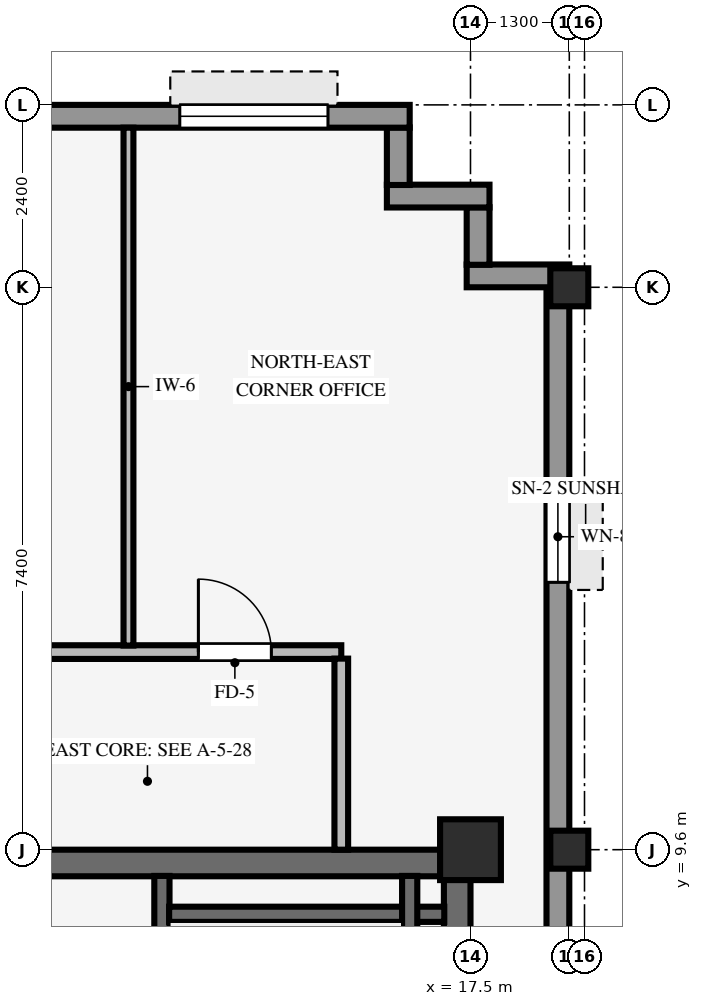
"""IFC4 building model, lengths in metres.
Left out: names, types, materials, properties, quantities, classifications, styles, units other than length and angle.
Written with IfcOpenShell. Run it as: python <this file> out.ifc"""

import sys

from ifc_helpers import new_model, si_unit, direction, frame, frame_2d, origin, origin_2d, place, context, subcontext, project, spatial, rectangle, hollow_rectangle, extrude, source, transform, mapped, element, fill, save


model = new_model("IFC4")
c1 = context("Model", 3, precision=1e-05, world=origin(), true_north=direction((0.0, 1.0)))
c2 = subcontext(c1, "Body", "Model", "MODEL_VIEW")
j1 = project(units=[si_unit("LENGTHUNIT", "METRE"), si_unit("PLANEANGLEUNIT", "RADIAN")], contexts=[c1])
p1 = place(None, origin())
s1 = spatial("IfcSite", under=j1, at=p1, CompositionType="ELEMENT")
p2 = place(p1, origin())
s2 = spatial("IfcBuilding", under=s1, at=p2, CompositionType="ELEMENT")
p3 = place(p2, frame((0.0, 0.0, 261.6)))
s3 = spatial("IfcBuildingStorey", under=s2, at=p3, CompositionType="ELEMENT", Elevation=261.6)
p4 = place(p3, frame((9.0, 9.425, 0.0), z_axis=(0.0, 0.0, 1.0), x_axis=(1.0, 0.0, 0.0)))
e1 = element("IfcWall", 1, at=p4, inside=s3, PredefinedType="SHEAR", context=c2, shape_type="SweptSolid", body=[
    extrude(rectangle(XDim=8.5, YDim=0.35, at=frame_2d((4.25, 0.0))), origin(), (0.0, 0.0, 1.0), 3.37),
])
p5 = place(p3, frame((17.325, -9.255, 0.0), z_axis=(0.0, 0.0, 1.0), x_axis=(0.0, 1.0, 0.0)))
e2 = element("IfcWall", 2, at=p5, inside=s3, PredefinedType="SHEAR", context=c2, shape_type="SweptSolid", body=[
    extrude(rectangle(XDim=18.51, YDim=0.35, at=frame_2d((9.255, 0.0))), origin(), (0.0, 0.0, 1.0), 3.37),
])
p6 = place(p3, frame((17.5, 9.6, 0.0), z_axis=(0.0, 0.0, 1.0), x_axis=(1.0, 0.0, 0.0)))
e3 = element("IfcColumn", 3, at=p6, inside=s3, PredefinedType="COLUMN", context=c2, shape_type="SweptSolid", body=[
    extrude(rectangle(XDim=0.8, YDim=0.8, at=origin_2d()), origin(), (0.0, 0.0, 1.0), 3.37),
])
for number, where, z_axis, x_axis in (
    (4, (18.8, 9.6, 0.0), (0.0, 0.0, 1.0), (1.0, 0.0, 0.0)),
    (5, (18.8, 17.0, 0.0), (0.0, 0.0, 1.0), (1.0, 0.0, 0.0)),
):
    element("IfcColumn", number, at=place(p3, frame(where, z_axis=z_axis, x_axis=x_axis)), inside=s3, PredefinedType="COLUMN", context=c2, shape_type="SweptSolid", body=[
        extrude(hollow_rectangle(XDim=0.5, YDim=0.5, WallThickness=0.032, InnerFilletRadius=0.032, OuterFilletRadius=0.064, at=origin_2d()), origin(), (0.0, 0.0, 1.0), 3.37),
    ])
p7 = place(p3, frame((18.65, -17.004, 0.0), z_axis=(0.0, 0.0, 1.0), x_axis=(0.0, 1.0, 0.0)))
e6 = element("IfcWall", 6, at=p7, inside=s3, PredefinedType="STANDARD", context=c2, shape_type="SweptSolid", body=[
    extrude(rectangle(XDim=34.008, YDim=0.3, at=frame_2d((17.004, 0.0))), origin(), (0.0, 0.0, 1.0), 2.705),
])
p8 = place(p7, frame((2.686, 0.0, 0.8)))
e7 = element("IfcOpeningElement", 7, at=p8, cuts=e6, PredefinedType="OPENING", context=c2, shape_type="SweptSolid", body=[
    extrude(rectangle(XDim=1.2, YDim=1.48, at=frame_2d((0.6, 0.74))), frame((0.0, 0.16, 0.0), z_axis=(0.0, -1.0, 0.0), x_axis=(1.0, 0.0, 0.0)), (0.0, 0.0, 1.0), 0.32),
])
p9 = place(p7, frame((30.122, 0.0, 0.8)))
e8 = element("IfcOpeningElement", 8, at=p9, cuts=e6, PredefinedType="OPENING", context=c2, shape_type="SweptSolid", body=[
    extrude(rectangle(XDim=1.2, YDim=1.48, at=frame_2d((0.6, 0.74))), frame((0.0, 0.16, 0.0), z_axis=(0.0, -1.0, 0.0), x_axis=(1.0, 0.0, 0.0)), (0.0, 0.0, 1.0), 0.32),
])
p10 = place(p3, frame((17.45, 17.15, 0.0), z_axis=(0.0, 0.0, 1.0), x_axis=(1.0, 0.0, 0.0)))
e9 = element("IfcWall", 9, at=p10, inside=s3, PredefinedType="STANDARD", context=c2, shape_type="SweptSolid", body=[
    extrude(rectangle(XDim=1.35, YDim=0.3, at=frame_2d((0.675, 0.0))), origin(), (0.0, 0.0, 1.0), 2.892),
])
p11 = place(p3, frame((17.6, 17.296, 0.0), z_axis=(0.0, 0.0, 1.0), x_axis=(0.0, 1.0, 0.0)))
e10 = element("IfcWall", 10, at=p11, inside=s3, PredefinedType="STANDARD", context=c2, shape_type="SweptSolid", body=[
    extrude(rectangle(XDim=0.758, YDim=0.3, at=frame_2d((0.379, 0.0))), origin(), (0.0, 0.0, 1.0), 2.892),
])
p12 = place(p3, frame((16.4, 18.2, 0.0), z_axis=(0.0, 0.0, 1.0), x_axis=(1.0, 0.0, 0.0)))
e11 = element("IfcWall", 11, at=p12, inside=s3, PredefinedType="STANDARD", context=c2, shape_type="SweptSolid", body=[
    extrude(rectangle(XDim=1.35, YDim=0.3, at=frame_2d((0.675, 0.0))), origin(), (0.0, 0.0, 1.0), 2.892),
])
p13 = place(p3, frame((16.55, 18.346, 0.0), z_axis=(0.0, 0.0, 1.0), x_axis=(0.0, 1.0, 0.0)))
e12 = element("IfcWall", 12, at=p13, inside=s3, PredefinedType="STANDARD", context=c2, shape_type="SweptSolid", body=[
    extrude(rectangle(XDim=0.758, YDim=0.3, at=frame_2d((0.379, 0.0))), origin(), (0.0, 0.0, 1.0), 2.892),
])
p14 = place(p3, frame((-18.9, 19.25, 0.0), z_axis=(0.0, 0.0, 1.0), x_axis=(1.0, 0.0, 0.0)))
e13 = element("IfcWall", 13, at=p14, inside=s3, PredefinedType="STANDARD", context=c2, shape_type="SweptSolid", body=[
    extrude(rectangle(XDim=35.6, YDim=0.3, at=frame_2d((17.8, 0.0))), origin(), (0.0, 0.0, 1.0), 2.705),
])
p15 = place(p14, frame((13.6, 0.0, 0.0)))
e14 = element("IfcOpeningElement", 14, at=p15, cuts=e13, PredefinedType="OPENING", context=c2, shape_type="SweptSolid", body=[
    extrude(rectangle(XDim=0.98, YDim=2.15, at=frame_2d((0.49, 1.075))), frame((0.0, 0.16, 0.0), z_axis=(0.0, -1.0, 0.0), x_axis=(1.0, 0.0, 0.0)), (0.0, 0.0, 1.0), 0.32),
])
p16 = place(p14, frame((2.425, 0.0, 0.8)))
e15 = element("IfcOpeningElement", 15, at=p16, cuts=e13, PredefinedType="OPENING", context=c2, shape_type="SweptSolid", body=[
    extrude(rectangle(XDim=1.95, YDim=1.48, at=frame_2d((0.975, 0.74))), frame((0.0, 0.16, 0.0), z_axis=(0.0, -1.0, 0.0), x_axis=(1.0, 0.0, 0.0)), (0.0, 0.0, 1.0), 0.32),
])
p17 = place(p14, frame((7.225, 0.0, 0.8)))
e16 = element("IfcOpeningElement", 16, at=p17, cuts=e13, PredefinedType="OPENING", context=c2, shape_type="SweptSolid", body=[
    extrude(rectangle(XDim=1.95, YDim=1.48, at=frame_2d((0.975, 0.74))), frame((0.0, 0.16, 0.0), z_axis=(0.0, -1.0, 0.0), x_axis=(1.0, 0.0, 0.0)), (0.0, 0.0, 1.0), 0.32),
])
p18 = place(p14, frame((15.475, 0.0, 0.8)))
e17 = element("IfcOpeningElement", 17, at=p18, cuts=e13, PredefinedType="OPENING", context=c2, shape_type="SweptSolid", body=[
    extrude(rectangle(XDim=1.95, YDim=1.48, at=frame_2d((0.975, 0.74))), frame((0.0, 0.16, 0.0), z_axis=(0.0, -1.0, 0.0), x_axis=(1.0, 0.0, 0.0)), (0.0, 0.0, 1.0), 0.32),
])
p19 = place(p14, frame((21.625, 0.0, 0.8)))
e18 = element("IfcOpeningElement", 18, at=p19, cuts=e13, PredefinedType="OPENING", context=c2, shape_type="SweptSolid", body=[
    extrude(rectangle(XDim=1.95, YDim=1.48, at=frame_2d((0.975, 0.74))), frame((0.0, 0.16, 0.0), z_axis=(0.0, -1.0, 0.0), x_axis=(1.0, 0.0, 0.0)), (0.0, 0.0, 1.0), 0.32),
])
p20 = place(p14, frame((32.575, 0.0, 0.8)))
e19 = element("IfcOpeningElement", 19, at=p20, cuts=e13, PredefinedType="OPENING", context=c2, shape_type="SweptSolid", body=[
    extrude(rectangle(XDim=1.95, YDim=1.48, at=frame_2d((0.975, 0.74))), frame((0.0, 0.16, 0.0), z_axis=(0.0, -1.0, 0.0), x_axis=(1.0, 0.0, 0.0)), (0.0, 0.0, 1.0), 0.32),
])
p21 = place(p3, frame((13.44, 0.9, 0.0), z_axis=(0.0, 0.0, 1.0), x_axis=(0.0, 1.0, 0.0)))
e20 = element("IfcWall", 20, at=p21, inside=s3, PredefinedType="SHEAR", context=c2, shape_type="SweptSolid", body=[
    extrude(rectangle(XDim=8.355, YDim=0.2, at=frame_2d((4.177, 0.0))), origin(), (0.0, 0.0, 1.0), 3.37),
])
p22 = place(p21, frame((0.43, 0.0, 0.0)))
e21 = element("IfcOpeningElement", 21, at=p22, cuts=e20, PredefinedType="OPENING", context=c2, shape_type="SweptSolid", body=[
    extrude(rectangle(XDim=1.1, YDim=2.15, at=frame_2d((0.55, 1.075))), frame((0.0, 0.11, 0.0), z_axis=(0.0, -1.0, 0.0), x_axis=(1.0, 0.0, 0.0)), (0.0, 0.0, 1.0), 0.22),
])
p23 = place(p3, frame((13.535, 8.75, 0.0), z_axis=(0.0, 0.0, 1.0), x_axis=(1.0, 0.0, 0.0)))
e22 = element("IfcWall", 22, at=p23, inside=s3, PredefinedType="SHEAR", context=c2, shape_type="SweptSolid", body=[
    extrude(rectangle(XDim=3.62, YDim=0.2, at=frame_2d((1.81, 0.0))), origin(), (0.0, 0.0, 1.0), 3.37),
])
p24 = place(p3, frame((16.7, 1.095, 0.0), z_axis=(0.0, 0.0, 1.0), x_axis=(0.0, 1.0, 0.0)))
e23 = element("IfcWall", 23, at=p24, inside=s3, PredefinedType="SHEAR", context=c2, shape_type="SweptSolid", body=[
    extrude(rectangle(XDim=8.16, YDim=0.2, at=frame_2d((4.08, 0.0))), origin(), (0.0, 0.0, 1.0), 3.37),
])
p25 = place(p3, frame((-9.0, 12.2, 0.0), z_axis=(0.0, 0.0, 1.0), x_axis=(1.0, 0.0, 0.0)))
e24 = element("IfcWall", 24, at=p25, inside=s3, PredefinedType="PARTITIONING", context=c2, shape_type="SweptSolid", body=[
    extrude(rectangle(XDim=24.8, YDim=0.18, at=frame_2d((12.4, 0.0))), origin(), (0.0, 0.0, 1.0), 3.36),
])
p26 = place(p25, frame((11.42, 0.0, 0.0)))
e25 = element("IfcOpeningElement", 25, at=p26, cuts=e24, PredefinedType="OPENING", context=c2, shape_type="SweptSolid", body=[
    extrude(rectangle(XDim=0.96, YDim=2.1, at=frame_2d((0.48, 1.05))), frame((0.0, 0.1, 0.0), z_axis=(0.0, -1.0, 0.0), x_axis=(1.0, 0.0, 0.0)), (0.0, 0.0, 1.0), 0.2),
])
p27 = place(p25, frame((4.82, 0.0, 0.0)))
e26 = element("IfcOpeningElement", 26, at=p27, cuts=e24, PredefinedType="OPENING", context=c2, shape_type="SweptSolid", body=[
    extrude(rectangle(XDim=0.96, YDim=2.1, at=frame_2d((0.48, 1.05))), frame((0.0, 0.1, 0.0), z_axis=(0.0, -1.0, 0.0), x_axis=(1.0, 0.0, 0.0)), (0.0, 0.0, 1.0), 0.2),
])
p28 = place(p25, frame((19.52, 0.0, 0.0)))
e27 = element("IfcOpeningElement", 27, at=p28, cuts=e24, PredefinedType="OPENING", context=c2, shape_type="SweptSolid", body=[
    extrude(rectangle(XDim=0.96, YDim=2.1, at=frame_2d((0.48, 1.05))), frame((0.0, 0.1, 0.0), z_axis=(0.0, -1.0, 0.0), x_axis=(1.0, 0.0, 0.0)), (0.0, 0.0, 1.0), 0.2),
])
p29 = place(p25, frame((22.92, 0.0, 0.0)))
e28 = element("IfcOpeningElement", 28, at=p29, cuts=e24, PredefinedType="OPENING", context=c2, shape_type="SweptSolid", body=[
    extrude(rectangle(XDim=0.96, YDim=2.1, at=frame_2d((0.48, 1.05))), frame((0.0, 0.1, 0.0), z_axis=(0.0, -1.0, 0.0), x_axis=(1.0, 0.0, 0.0)), (0.0, 0.0, 1.0), 0.2),
])
p30 = place(p25, frame((0.75, 0.0, 0.0)))
e29 = element("IfcOpeningElement", 29, at=p30, cuts=e24, PredefinedType="OPENING", context=c2, shape_type="SweptSolid", body=[
    extrude(rectangle(XDim=0.9, YDim=2.1, at=frame_2d((0.45, 1.05))), frame((0.0, 0.1, 0.0), z_axis=(0.0, -1.0, 0.0), x_axis=(1.0, 0.0, 0.0)), (0.0, 0.0, 1.0), 0.2),
])
p31 = place(p3, frame((13.0, 12.286, 0.0), z_axis=(0.0, 0.0, 1.0), x_axis=(0.0, 1.0, 0.0)))
e30 = element("IfcWall", 30, at=p31, inside=s3, PredefinedType="PARTITIONING", context=c2, shape_type="SweptSolid", body=[
    extrude(rectangle(XDim=6.814, YDim=0.13, at=frame_2d((3.407, 0.0))), origin(), (0.0, 0.0, 1.0), 3.36),
])
p32 = place(p3, frame((15.8, 9.6, 0.0), z_axis=(0.0, 0.0, 1.0), x_axis=(0.0, 1.0, 0.0)))
e31 = element("IfcWall", 31, at=p32, inside=s3, PredefinedType="PARTITIONING", context=c2, shape_type="SweptSolid", body=[
    extrude(rectangle(XDim=2.514, YDim=0.18, at=frame_2d((1.257, 0.0))), origin(), (0.0, 0.0, 1.0), 3.36),
])
m1 = source(origin(), c2, "Body", "SweptSolid", [
    extrude(rectangle(XDim=1.2, YDim=1.48, at=frame_2d((0.6, 0.74))), frame((0.0, 0.03, 0.0), z_axis=(0.0, -1.0, 0.0), x_axis=(1.0, 0.0, 0.0)), (0.0, 0.0, 1.0), 0.06),
])
p33 = place(p9, origin())
e32 = element("IfcWindow", 32, at=p33, inside=s3, PartitioningType="SINGLE_PANEL", PredefinedType="WINDOW", context=c2, shape_type="MappedRepresentation", body=[
    mapped(m1, transform((0.0, 0.0, 0.0), scale=1.0)),
])
fill(e8, e32)
m2 = source(origin(), c2, "Body", "SweptSolid", [
    extrude(rectangle(XDim=1.95, YDim=1.48, at=frame_2d((0.975, 0.74))), frame((0.0, 0.03, 0.0), z_axis=(0.0, -1.0, 0.0), x_axis=(1.0, 0.0, 0.0)), (0.0, 0.0, 1.0), 0.06),
])
p34 = place(p20, origin())
e33 = element("IfcWindow", 33, at=p34, inside=s3, PartitioningType="SINGLE_PANEL", PredefinedType="WINDOW", context=c2, shape_type="MappedRepresentation", body=[
    mapped(m2, transform((0.0, 0.0, 0.0), scale=1.0)),
])
fill(e19, e33)
m3 = source(origin(), c2, "Body", "SweptSolid", [
    extrude(rectangle(XDim=0.96, YDim=2.1, at=frame_2d((0.48, 1.05))), frame((0.0, 0.025, 0.0), z_axis=(0.0, -1.0, 0.0), x_axis=(1.0, 0.0, 0.0)), (0.0, 0.0, 1.0), 0.05),
])
p35 = place(p29, origin())
e34 = element("IfcDoor", 34, at=p35, inside=s3, OperationType="SINGLE_SWING_LEFT", PredefinedType="DOOR", context=c2, shape_type="MappedRepresentation", body=[
    mapped(m3, transform((0.0, 0.0, 0.0), scale=1.0)),
])
fill(e28, e34)
save(model, sys.argv[1])
